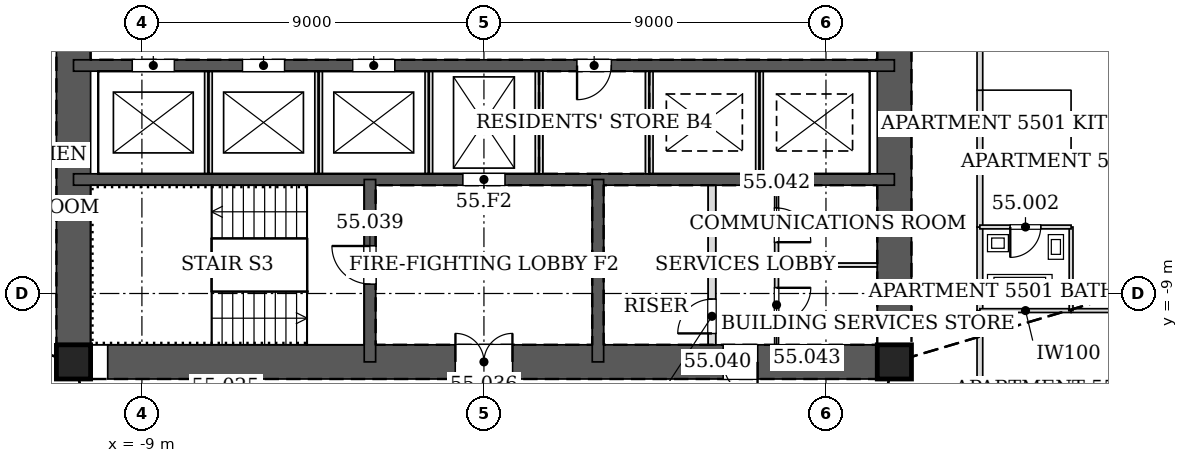
"""IFC4 building model, lengths in metres.
Left out: names, types, materials, properties, quantities, classifications, styles, units other than length and angle.
Written with IfcOpenShell. Run it as: python <this file> out.ifc"""

import sys

from ifc_helpers import new_model, si_unit, direction, frame, frame_2d, origin, origin_2d, place, context, subcontext, project, spatial, rectangle, hollow_rectangle, extrude, element, fill, save


model = new_model("IFC4")
c1 = context("Model", 3, precision=1e-05, world=origin(), true_north=direction((0.0, 1.0)))
c2 = subcontext(c1, "Body", "Model", "MODEL_VIEW")
j1 = project(units=[si_unit("LENGTHUNIT", "METRE"), si_unit("PLANEANGLEUNIT", "RADIAN")], contexts=[c1])
p1 = place(None, origin())
s1 = spatial("IfcSite", under=j1, at=p1, CompositionType="ELEMENT")
p2 = place(p1, origin())
s2 = spatial("IfcBuilding", under=s1, at=p2, CompositionType="ELEMENT")
p3 = place(p2, frame((0.0, 0.0, 234.6)))
s3 = spatial("IfcBuildingStorey", under=s2, at=p3, CompositionType="ELEMENT", Elevation=234.6)
for number, where, z_axis, x_axis in (
    (1, (-10.8, -10.8, 0.0), (0.0, 0.0, 1.0), (1.0, 0.0, 0.0)),
    (2, (10.8, -10.8, 0.0), (0.0, 0.0, 1.0), (1.0, 0.0, 0.0)),
):
    element("IfcColumn", number, at=place(p3, frame(where, z_axis=z_axis, x_axis=x_axis)), inside=s3, PredefinedType="COLUMN", context=c2, shape_type="SweptSolid", body=[
        extrude(hollow_rectangle(XDim=0.9, YDim=0.9, WallThickness=0.04, at=origin_2d()), origin(), (0.0, 0.0, 1.0), 3.4),
    ])
p4 = place(p3, frame((-10.8, -10.8, 0.0), z_axis=(0.0, 0.0, 1.0), x_axis=(1.0, 0.0, 0.0)))
e3 = element("IfcWall", 3, at=p4, inside=s3, PredefinedType="SOLIDWALL", context=c2, shape_type="SweptSolid", body=[
    extrude(rectangle(XDim=21.6, YDim=0.9, at=frame_2d((10.8, 0.0))), origin(), (0.0, 0.0, 1.0), 3.4),
])
p5 = place(p4, frame((10.05, 0.0, 0.0)))
e4 = element("IfcOpeningElement", 4, at=p5, cuts=e3, PredefinedType="OPENING", context=c2, shape_type="SweptSolid", body=[
    extrude(rectangle(XDim=1.5, YDim=2.1, at=frame_2d((0.75, 1.05))), frame((0.0, 0.46, 0.0), z_axis=(0.0, -1.0, 0.0), x_axis=(1.0, 0.0, 0.0)), (0.0, 0.0, 1.0), 0.92),
])
p6 = place(p4, frame((17.1, 0.0, 0.0)))
e5 = element("IfcOpeningElement", 5, at=p6, cuts=e3, PredefinedType="OPENING", context=c2, shape_type="SweptSolid", body=[
    extrude(rectangle(XDim=0.9, YDim=2.1, at=frame_2d((0.45, 1.05))), frame((0.0, 0.46, 0.0), z_axis=(0.0, -1.0, 0.0), x_axis=(1.0, 0.0, 0.0)), (0.0, 0.0, 1.0), 0.92),
])
p7 = place(p3, frame((10.8, -10.8, 0.0), z_axis=(0.0, 0.0, 1.0), x_axis=(0.0, 1.0, 0.0)))
e6 = element("IfcWall", 6, at=p7, inside=s3, PredefinedType="SOLIDWALL", context=c2, shape_type="SweptSolid", body=[
    extrude(rectangle(XDim=21.6, YDim=0.9, at=frame_2d((10.8, 0.0))), origin(), (0.0, 0.0, 1.0), 3.4),
])
p8 = place(p7, frame((11.7, 0.0, 0.0)))
e7 = element("IfcOpeningElement", 7, at=p8, cuts=e6, PredefinedType="OPENING", context=c2, shape_type="SweptSolid", body=[
    extrude(rectangle(XDim=1.2, YDim=2.1, at=frame_2d((0.6, 1.05))), frame((0.0, 0.46, 0.0), z_axis=(0.0, -1.0, 0.0), x_axis=(1.0, 0.0, 0.0)), (0.0, 0.0, 1.0), 0.92),
])
p9 = place(p7, frame((8.7, 0.0, 0.0)))
e8 = element("IfcOpeningElement", 8, at=p9, cuts=e6, PredefinedType="OPENING", context=c2, shape_type="SweptSolid", body=[
    extrude(rectangle(XDim=1.2, YDim=2.1, at=frame_2d((0.6, 1.05))), frame((0.0, 0.46, 0.0), z_axis=(0.0, -1.0, 0.0), x_axis=(1.0, 0.0, 0.0)), (0.0, 0.0, 1.0), 0.92),
])
p10 = place(p3, frame((-10.8, 10.8, 0.0), z_axis=(0.0, 0.0, 1.0), x_axis=(0.0, -1.0, 0.0)))
e9 = element("IfcWall", 9, at=p10, inside=s3, PredefinedType="SOLIDWALL", context=c2, shape_type="SweptSolid", body=[
    extrude(rectangle(XDim=21.6, YDim=0.9, at=frame_2d((10.8, 0.0))), origin(), (0.0, 0.0, 1.0), 3.4),
])
p11 = place(p10, frame((8.7, 0.0, 0.0)))
e10 = element("IfcOpeningElement", 10, at=p11, cuts=e9, PredefinedType="OPENING", context=c2, shape_type="SweptSolid", body=[
    extrude(rectangle(XDim=1.2, YDim=2.1, at=frame_2d((0.6, 1.05))), frame((0.0, 0.46, 0.0), z_axis=(0.0, -1.0, 0.0), x_axis=(1.0, 0.0, 0.0)), (0.0, 0.0, 1.0), 0.92),
])
p12 = place(p10, frame((11.7, 0.0, 0.0)))
e11 = element("IfcOpeningElement", 11, at=p12, cuts=e9, PredefinedType="OPENING", context=c2, shape_type="SweptSolid", body=[
    extrude(rectangle(XDim=1.2, YDim=2.1, at=frame_2d((0.6, 1.05))), frame((0.0, 0.46, 0.0), z_axis=(0.0, -1.0, 0.0), x_axis=(1.0, 0.0, 0.0)), (0.0, 0.0, 1.0), 0.92),
])
p13 = place(p3, frame((-10.8, -3.0, 0.0), z_axis=(0.0, 0.0, 1.0), x_axis=(1.0, 0.0, 0.0)))
e12 = element("IfcWall", 12, at=p13, inside=s3, PredefinedType="SOLIDWALL", context=c2, shape_type="SweptSolid", body=[
    extrude(rectangle(XDim=21.6, YDim=0.3, at=frame_2d((10.8, 0.0))), origin(), (0.0, 0.0, 1.0), 3.4),
])
p14 = place(p13, frame((13.25, 0.0, 0.0)))
e13 = element("IfcOpeningElement", 13, at=p14, cuts=e12, PredefinedType="OPENING", context=c2, shape_type="SweptSolid", body=[
    extrude(rectangle(XDim=0.9, YDim=2.1, at=frame_2d((0.45, 1.05))), frame((0.0, 0.16, 0.0), z_axis=(0.0, -1.0, 0.0), x_axis=(1.0, 0.0, 0.0)), (0.0, 0.0, 1.0), 0.32),
])
p15 = place(p13, frame((1.55, 0.0, 0.0)))
e14 = element("IfcOpeningElement", 14, at=p15, cuts=e12, PredefinedType="OPENING", context=c2, shape_type="SweptSolid", body=[
    extrude(rectangle(XDim=1.1, YDim=2.1, at=frame_2d((0.55, 1.05))), frame((0.0, 0.16, 0.0), z_axis=(0.0, -1.0, 0.0), x_axis=(1.0, 0.0, 0.0)), (0.0, 0.0, 1.0), 0.32),
])
p16 = place(p13, frame((4.45, 0.0, 0.0)))
e15 = element("IfcOpeningElement", 15, at=p16, cuts=e12, PredefinedType="OPENING", context=c2, shape_type="SweptSolid", body=[
    extrude(rectangle(XDim=1.1, YDim=2.1, at=frame_2d((0.55, 1.05))), frame((0.0, 0.16, 0.0), z_axis=(0.0, -1.0, 0.0), x_axis=(1.0, 0.0, 0.0)), (0.0, 0.0, 1.0), 0.32),
])
p17 = place(p13, frame((7.35, 0.0, 0.0)))
e16 = element("IfcOpeningElement", 16, at=p17, cuts=e12, PredefinedType="OPENING", context=c2, shape_type="SweptSolid", body=[
    extrude(rectangle(XDim=1.1, YDim=2.1, at=frame_2d((0.55, 1.05))), frame((0.0, 0.16, 0.0), z_axis=(0.0, -1.0, 0.0), x_axis=(1.0, 0.0, 0.0)), (0.0, 0.0, 1.0), 0.32),
])
p18 = place(p3, frame((-10.8, -6.0, 0.0), z_axis=(0.0, 0.0, 1.0), x_axis=(1.0, 0.0, 0.0)))
e17 = element("IfcWall", 17, at=p18, inside=s3, PredefinedType="SOLIDWALL", context=c2, shape_type="SweptSolid", body=[
    extrude(rectangle(XDim=21.6, YDim=0.3, at=frame_2d((10.8, 0.0))), origin(), (0.0, 0.0, 1.0), 3.4),
])
p19 = place(p18, frame((10.25, 0.0, 0.0)))
e18 = element("IfcOpeningElement", 18, at=p19, cuts=e17, PredefinedType="OPENING", context=c2, shape_type="SweptSolid", body=[
    extrude(rectangle(XDim=1.1, YDim=2.1, at=frame_2d((0.55, 1.05))), frame((0.0, 0.16, 0.0), z_axis=(0.0, -1.0, 0.0), x_axis=(1.0, 0.0, 0.0)), (0.0, 0.0, 1.0), 0.32),
])
p20 = place(p3, frame((-3.0, -6.0, 0.0), z_axis=(0.0, 0.0, 1.0), x_axis=(0.0, -1.0, 0.0)))
e19 = element("IfcWall", 19, at=p20, inside=s3, PredefinedType="SOLIDWALL", context=c2, shape_type="SweptSolid", body=[
    extrude(rectangle(XDim=4.8, YDim=0.3, at=frame_2d((2.4, 0.0))), origin(), (0.0, 0.0, 1.0), 3.4),
])
p21 = place(p20, frame((1.75, 0.0, 0.0)))
e20 = element("IfcOpeningElement", 20, at=p21, cuts=e19, PredefinedType="OPENING", context=c2, shape_type="SweptSolid", body=[
    extrude(rectangle(XDim=1.0, YDim=2.1, at=frame_2d((0.5, 1.05))), frame((0.0, 0.16, 0.0), z_axis=(0.0, -1.0, 0.0), x_axis=(1.0, 0.0, 0.0)), (0.0, 0.0, 1.0), 0.32),
])
p22 = place(p3, frame((3.0, -6.0, 0.0), z_axis=(0.0, 0.0, 1.0), x_axis=(0.0, -1.0, 0.0)))
e21 = element("IfcWall", 21, at=p22, inside=s3, PredefinedType="SOLIDWALL", context=c2, shape_type="SweptSolid", body=[
    extrude(rectangle(XDim=4.8, YDim=0.3, at=frame_2d((2.4, 0.0))), origin(), (0.0, 0.0, 1.0), 3.4),
])
p23 = place(p3, frame((13.05, -13.05, 0.0), z_axis=(0.0, 0.0, 1.0), x_axis=(0.0, 1.0, 0.0)))
e22 = element("IfcWall", 22, at=p23, inside=s3, PredefinedType="PARTITIONING", context=c2, shape_type="SweptSolid", body=[
    extrude(rectangle(XDim=3.601, YDim=0.15, at=frame_2d((1.801, 0.0))), origin(), (0.0, 0.0, 1.0), 2.344),
])
p24 = place(p3, frame((13.05, -9.451, 0.0), z_axis=(0.0, 0.0, 1.0), x_axis=(0.0, 1.0, 0.0)))
e23 = element("IfcWall", 23, at=p24, inside=s3, PredefinedType="PARTITIONING", context=c2, shape_type="SweptSolid", body=[
    extrude(rectangle(XDim=2.202, YDim=0.15, at=frame_2d((1.101, 0.0))), origin(), (0.0, 0.0, 1.0), 2.73),
])
for number, where, z_axis, x_axis in (
    (24, (13.05, -5.451, 0.0), (0.0, 0.0, 1.0), (0.0, 1.0, 0.0)),
    (25, (13.05, -7.251, 0.0), (0.0, 0.0, 1.0), (0.0, 1.0, 0.0)),
):
    element("IfcWall", number, at=place(p3, frame(where, z_axis=z_axis, x_axis=x_axis)), inside=s3, PredefinedType="PARTITIONING", context=c2, shape_type="SweptSolid", body=[
        extrude(rectangle(XDim=1.802, YDim=0.15, at=frame_2d((0.901, 0.0))), origin(), (0.0, 0.0, 1.0), 2.73),
    ])
p25 = place(p3, frame((13.05, -3.651, 0.0), z_axis=(0.0, 0.0, 1.0), x_axis=(0.0, 1.0, 0.0)))
e26 = element("IfcWall", 26, at=p25, inside=s3, PredefinedType="PARTITIONING", context=c2, shape_type="SweptSolid", body=[
    extrude(rectangle(XDim=3.202, YDim=0.15, at=frame_2d((1.601, 0.0))), origin(), (0.0, 0.0, 1.0), 2.73),
])
p26 = place(p25, frame((1.126, 0.0, 0.0)))
e27 = element("IfcOpeningElement", 27, at=p26, cuts=e26, PredefinedType="OPENING", context=c2, shape_type="SweptSolid", body=[
    extrude(rectangle(XDim=0.95, YDim=2.1, at=frame_2d((0.475, 1.05))), frame((0.0, 0.085, 0.0), z_axis=(0.0, -1.0, 0.0), x_axis=(1.0, 0.0, 0.0)), (0.0, 0.0, 1.0), 0.17),
])
p27 = place(p3, frame((15.451, -9.45, 0.0), z_axis=(0.0, 0.0, 1.0), x_axis=(-1.0, 0.0, 0.0)))
e28 = element("IfcWall", 28, at=p27, inside=s3, PredefinedType="PARTITIONING", context=c2, shape_type="SweptSolid", body=[
    extrude(rectangle(XDim=2.401, YDim=0.1, at=frame_2d((1.2, 0.0))), origin(), (0.0, 0.0, 1.0), 2.344),
])
p28 = place(p3, frame((20.762, -9.45, 0.0), z_axis=(0.0, 0.0, 1.0), x_axis=(-1.0, 0.0, 0.0)))
e29 = element("IfcWall", 29, at=p28, inside=s3, PredefinedType="PARTITIONING", context=c2, shape_type="SweptSolid", body=[
    extrude(rectangle(XDim=5.313, YDim=0.1, at=frame_2d((2.656, 0.0))), origin(), (0.0, 0.0, 1.0), 2.344),
])
p29 = place(p28, frame((2.034, 0.0, 0.0)))
e30 = element("IfcOpeningElement", 30, at=p29, cuts=e29, PredefinedType="OPENING", context=c2, shape_type="SweptSolid", body=[
    extrude(rectangle(XDim=0.85, YDim=2.1, at=frame_2d((0.425, 1.05))), frame((0.0, 0.06, 0.0), z_axis=(0.0, -1.0, 0.0), x_axis=(1.0, 0.0, 0.0)), (0.0, 0.0, 1.0), 0.12),
])
p30 = place(p3, frame((15.45, -9.45, 0.0), z_axis=(0.0, 0.0, 1.0), x_axis=(0.0, 1.0, 0.0)))
e31 = element("IfcWall", 31, at=p30, inside=s3, PredefinedType="PARTITIONING", context=c2, shape_type="SweptSolid", body=[
    extrude(rectangle(XDim=2.2, YDim=0.1, at=frame_2d((1.1, 0.0))), origin(), (0.0, 0.0, 1.0), 2.344),
])
p31 = place(p3, frame((15.45, -7.25, 0.0), z_axis=(0.0, 0.0, 1.0), x_axis=(-1.0, 0.0, 0.0)))
e32 = element("IfcWall", 32, at=p31, inside=s3, PredefinedType="PARTITIONING", context=c2, shape_type="SweptSolid", body=[
    extrude(rectangle(XDim=2.4, YDim=0.1, at=frame_2d((1.2, 0.0))), origin(), (0.0, 0.0, 1.0), 2.73),
])
p32 = place(p31, frame((0.8, 0.0, 0.0)))
e33 = element("IfcOpeningElement", 33, at=p32, cuts=e32, PredefinedType="OPENING", context=c2, shape_type="SweptSolid", body=[
    extrude(rectangle(XDim=0.8, YDim=2.1, at=frame_2d((0.4, 1.05))), frame((0.0, 0.06, 0.0), z_axis=(0.0, -1.0, 0.0), x_axis=(1.0, 0.0, 0.0)), (0.0, 0.0, 1.0), 0.12),
])
for number, where, z_axis, x_axis in (
    (34, (-7.25, -5.85, 0.0), (0.0, 0.0, 1.0), (0.0, 1.0, 0.0)),
    (35, (-4.35, -5.85, 0.0), (0.0, 0.0, 1.0), (0.0, 1.0, 0.0)),
    (36, (-1.45, -5.85, 0.0), (0.0, 0.0, 1.0), (0.0, 1.0, 0.0)),
):
    element("IfcWall", number, at=place(p3, frame(where, z_axis=z_axis, x_axis=x_axis)), inside=s3, PredefinedType="PARTITIONING", context=c2, shape_type="SweptSolid", body=[
        extrude(rectangle(XDim=2.7, YDim=0.2, at=frame_2d((1.35, 0.0))), origin(), (0.0, 0.0, 1.0), 3.4),
    ])
for number, where, z_axis, x_axis in (
    (37, (1.45, -5.85, 0.0), (0.0, 0.0, 1.0), (0.0, 1.0, 0.0)),
    (38, (4.35, -5.85, 0.0), (0.0, 0.0, 1.0), (0.0, 1.0, 0.0)),
):
    element("IfcWall", number, at=place(p3, frame(where, z_axis=z_axis, x_axis=x_axis)), inside=s3, PredefinedType="PARTITIONING", context=c2, shape_type="SweptSolid", body=[
        extrude(rectangle(XDim=2.7, YDim=0.2, at=frame_2d((1.35, 0.0))), origin(), (0.0, 0.0, 1.0), 3.2),
    ])
p33 = place(p3, frame((7.25, -5.85, 0.0), z_axis=(0.0, 0.0, 1.0), x_axis=(0.0, 1.0, 0.0)))
e39 = element("IfcWall", 39, at=p33, inside=s3, PredefinedType="PARTITIONING", context=c2, shape_type="SweptSolid", body=[
    extrude(rectangle(XDim=2.7, YDim=0.2, at=frame_2d((1.35, 0.0))), origin(), (0.0, 0.0, 1.0), 3.4),
])
p34 = place(p3, frame((6.0, -10.35, 0.0), z_axis=(0.0, 0.0, 1.0), x_axis=(0.0, 1.0, 0.0)))
e40 = element("IfcWall", 40, at=p34, inside=s3, PredefinedType="PARTITIONING", context=c2, shape_type="SweptSolid", body=[
    extrude(rectangle(XDim=4.2, YDim=0.2, at=frame_2d((2.1, 0.0))), origin(), (0.0, 0.0, 1.0), 3.2),
])
p35 = place(p34, frame((0.3, 0.0, 0.0)))
e41 = element("IfcOpeningElement", 41, at=p35, cuts=e40, PredefinedType="OPENING", context=c2, shape_type="SweptSolid", body=[
    extrude(rectangle(XDim=0.9, YDim=2.1, at=frame_2d((0.45, 1.05))), frame((0.0, 0.11, 0.0), z_axis=(0.0, -1.0, 0.0), x_axis=(1.0, 0.0, 0.0)), (0.0, 0.0, 1.0), 0.22),
])
p36 = place(p3, frame((7.7, -10.35, 0.0), z_axis=(0.0, 0.0, 1.0), x_axis=(0.0, 1.0, 0.0)))
e42 = element("IfcWall", 42, at=p36, inside=s3, PredefinedType="PARTITIONING", context=c2, shape_type="SweptSolid", body=[
    extrude(rectangle(XDim=4.2, YDim=0.1, at=frame_2d((2.1, 0.0))), origin(), (0.0, 0.0, 1.0), 3.2),
])
p37 = place(p36, frame((2.7, 0.0, 0.0)))
e43 = element("IfcOpeningElement", 43, at=p37, cuts=e42, PredefinedType="OPENING", context=c2, shape_type="SweptSolid", body=[
    extrude(rectangle(XDim=0.9, YDim=2.1, at=frame_2d((0.45, 1.05))), frame((0.0, 0.06, 0.0), z_axis=(0.0, -1.0, 0.0), x_axis=(1.0, 0.0, 0.0)), (0.0, 0.0, 1.0), 0.12),
])
p38 = place(p36, frame((0.6, 0.0, 0.0)))
e44 = element("IfcOpeningElement", 44, at=p38, cuts=e42, PredefinedType="OPENING", context=c2, shape_type="SweptSolid", body=[
    extrude(rectangle(XDim=0.9, YDim=2.1, at=frame_2d((0.45, 1.05))), frame((0.0, 0.06, 0.0), z_axis=(0.0, -1.0, 0.0), x_axis=(1.0, 0.0, 0.0)), (0.0, 0.0, 1.0), 0.12),
])
p39 = place(p3, frame((7.7, -8.25, 0.0), z_axis=(0.0, 0.0, 1.0), x_axis=(1.0, 0.0, 0.0)))
e45 = element("IfcWall", 45, at=p39, inside=s3, PredefinedType="PARTITIONING", context=c2, shape_type="SweptSolid", body=[
    extrude(rectangle(XDim=2.65, YDim=0.1, at=frame_2d((1.325, 0.0))), origin(), (0.0, 0.0, 1.0), 3.2),
])
p40 = place(p32, origin())
e46 = element("IfcDoor", 46, at=p40, inside=s3, OperationType="SINGLE_SWING_RIGHT", PredefinedType="DOOR", context=c2, shape_type="SweptSolid", body=[
    extrude(rectangle(XDim=0.8, YDim=2.1, at=frame_2d((0.4, 1.05))), frame((0.0, 0.025, 0.0), z_axis=(0.0, -1.0, 0.0), x_axis=(1.0, 0.0, 0.0)), (0.0, 0.0, 1.0), 0.05),
])
fill(e33, e46)
p41 = place(p5, origin())
e47 = element("IfcDoor", 47, at=p41, inside=s3, OperationType="DOUBLE_DOOR_SINGLE_SWING", PredefinedType="DOOR", context=c2, shape_type="SweptSolid", body=[
    extrude(rectangle(XDim=1.5, YDim=2.1, at=frame_2d((0.75, 1.05))), frame((0.0, 0.025, 0.0), z_axis=(0.0, -1.0, 0.0), x_axis=(1.0, 0.0, 0.0)), (0.0, 0.0, 1.0), 0.05),
])
fill(e4, e47)
p42 = place(p21, frame((1.0, 0.0, 0.0), z_axis=(0.0, 0.0, 1.0), x_axis=(-1.0, 0.0, 0.0)))
e48 = element("IfcDoor", 48, at=p42, inside=s3, OperationType="SINGLE_SWING_RIGHT", PredefinedType="DOOR", context=c2, shape_type="SweptSolid", body=[
    extrude(rectangle(XDim=1.0, YDim=2.1, at=frame_2d((0.5, 1.05))), frame((0.0, 0.025, 0.0), z_axis=(0.0, -1.0, 0.0), x_axis=(1.0, 0.0, 0.0)), (0.0, 0.0, 1.0), 0.05),
])
fill(e20, e48)
p43 = place(p6, frame((0.9, 0.0, 0.0), z_axis=(0.0, 0.0, 1.0), x_axis=(-1.0, 0.0, 0.0)))
e49 = element("IfcDoor", 49, at=p43, inside=s3, OperationType="SINGLE_SWING_LEFT", PredefinedType="DOOR", context=c2, shape_type="SweptSolid", body=[
    extrude(rectangle(XDim=0.9, YDim=2.1, at=frame_2d((0.45, 1.05))), frame((0.0, 0.025, 0.0), z_axis=(0.0, -1.0, 0.0), x_axis=(1.0, 0.0, 0.0)), (0.0, 0.0, 1.0), 0.05),
])
fill(e5, e49)
p44 = place(p35, origin())
e50 = element("IfcDoor", 50, at=p44, inside=s3, OperationType="SINGLE_SWING_LEFT", PredefinedType="DOOR", context=c2, shape_type="SweptSolid", body=[
    extrude(rectangle(XDim=0.9, YDim=2.1, at=frame_2d((0.45, 1.05))), frame((0.0, 0.025, 0.0), z_axis=(0.0, -1.0, 0.0), x_axis=(1.0, 0.0, 0.0)), (0.0, 0.0, 1.0), 0.05),
])
fill(e41, e50)
p45 = place(p37, frame((0.9, 0.0, 0.0), z_axis=(0.0, 0.0, 1.0), x_axis=(-1.0, 0.0, 0.0)))
e51 = element("IfcDoor", 51, at=p45, inside=s3, OperationType="SINGLE_SWING_RIGHT", PredefinedType="DOOR", context=c2, shape_type="SweptSolid", body=[
    extrude(rectangle(XDim=0.9, YDim=2.1, at=frame_2d((0.45, 1.05))), frame((0.0, 0.025, 0.0), z_axis=(0.0, -1.0, 0.0), x_axis=(1.0, 0.0, 0.0)), (0.0, 0.0, 1.0), 0.05),
])
fill(e43, e51)
p46 = place(p38, frame((0.9, 0.0, 0.0), z_axis=(0.0, 0.0, 1.0), x_axis=(-1.0, 0.0, 0.0)))
e52 = element("IfcDoor", 52, at=p46, inside=s3, OperationType="SINGLE_SWING_LEFT", PredefinedType="DOOR", context=c2, shape_type="SweptSolid", body=[
    extrude(rectangle(XDim=0.9, YDim=2.1, at=frame_2d((0.45, 1.05))), frame((0.0, 0.025, 0.0), z_axis=(0.0, -1.0, 0.0), x_axis=(1.0, 0.0, 0.0)), (0.0, 0.0, 1.0), 0.05),
])
fill(e44, e52)
p47 = place(p14, frame((0.9, 0.0, 0.0), z_axis=(0.0, 0.0, 1.0), x_axis=(-1.0, 0.0, 0.0)))
e53 = element("IfcDoor", 53, at=p47, inside=s3, OperationType="SINGLE_SWING_RIGHT", PredefinedType="DOOR", context=c2, shape_type="SweptSolid", body=[
    extrude(rectangle(XDim=0.9, YDim=2.1, at=frame_2d((0.45, 1.05))), frame((0.0, 0.025, 0.0), z_axis=(0.0, -1.0, 0.0), x_axis=(1.0, 0.0, 0.0)), (0.0, 0.0, 1.0), 0.05),
])
fill(e13, e53)
p48 = place(p19, origin())
e54 = element("IfcDoor", 54, at=p48, inside=s3, OperationType="DOUBLE_DOOR_SLIDING", PredefinedType="DOOR", context=c2, shape_type="SweptSolid", body=[
    extrude(rectangle(XDim=1.1, YDim=2.1, at=frame_2d((0.55, 1.05))), frame((0.0, 0.025, 0.0), z_axis=(0.0, -1.0, 0.0), x_axis=(1.0, 0.0, 0.0)), (0.0, 0.0, 1.0), 0.05),
])
fill(e18, e54)
p49 = place(p15, origin())
e55 = element("IfcDoor", 55, at=p49, inside=s3, OperationType="DOUBLE_DOOR_SLIDING", PredefinedType="DOOR", context=c2, shape_type="SweptSolid", body=[
    extrude(rectangle(XDim=1.1, YDim=2.1, at=frame_2d((0.55, 1.05))), frame((0.0, 0.025, 0.0), z_axis=(0.0, -1.0, 0.0), x_axis=(1.0, 0.0, 0.0)), (0.0, 0.0, 1.0), 0.05),
])
fill(e14, e55)
p50 = place(p16, origin())
e56 = element("IfcDoor", 56, at=p50, inside=s3, OperationType="DOUBLE_DOOR_SLIDING", PredefinedType="DOOR", context=c2, shape_type="SweptSolid", body=[
    extrude(rectangle(XDim=1.1, YDim=2.1, at=frame_2d((0.55, 1.05))), frame((0.0, 0.025, 0.0), z_axis=(0.0, -1.0, 0.0), x_axis=(1.0, 0.0, 0.0)), (0.0, 0.0, 1.0), 0.05),
])
fill(e15, e56)
p51 = place(p17, origin())
e57 = element("IfcDoor", 57, at=p51, inside=s3, OperationType="DOUBLE_DOOR_SLIDING", PredefinedType="DOOR", context=c2, shape_type="SweptSolid", body=[
    extrude(rectangle(XDim=1.1, YDim=2.1, at=frame_2d((0.55, 1.05))), frame((0.0, 0.025, 0.0), z_axis=(0.0, -1.0, 0.0), x_axis=(1.0, 0.0, 0.0)), (0.0, 0.0, 1.0), 0.05),
])
fill(e16, e57)
save(model, sys.argv[1])
